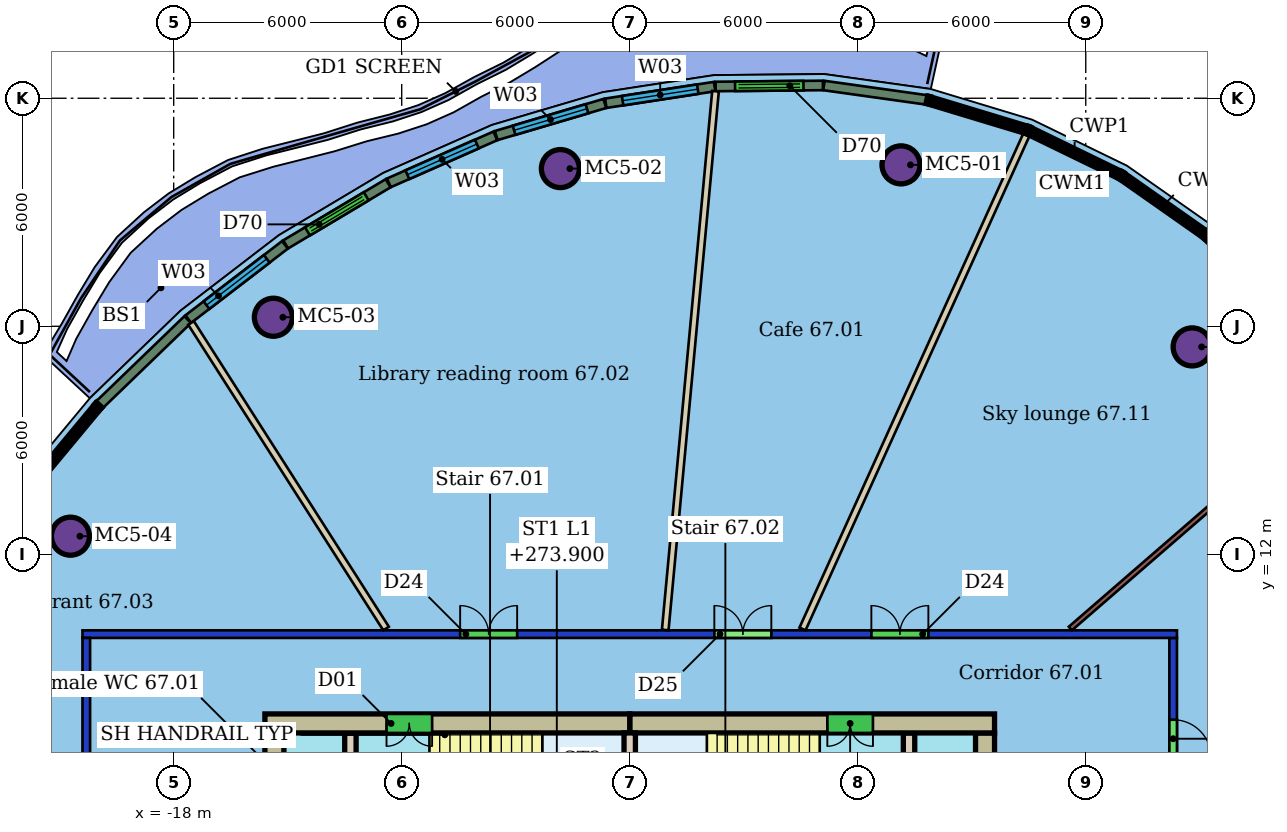
"""IFC4 building model, lengths in metres.
Left out: names, types, materials, properties, quantities, classifications, styles, units other than length and angle.
Written with IfcOpenShell. Run it as: python <this file> out.ifc"""

import sys

from ifc_helpers import new_model, si_unit, direction, frame, frame_2d, origin, origin_2d, place, context, subcontext, project, spatial, rectangle, hollow_circle, extrude, element, fill, save


model = new_model("IFC4")
c1 = context("Model", 3, precision=1e-05, world=origin(), true_north=direction((0.0, 1.0)))
c2 = subcontext(c1, "Body", "Model", "MODEL_VIEW")
j1 = project(units=[si_unit("LENGTHUNIT", "METRE"), si_unit("PLANEANGLEUNIT", "RADIAN")], contexts=[c1])
p1 = place(None, origin())
s1 = spatial("IfcSite", under=j1, at=p1, CompositionType="ELEMENT")
p2 = place(p1, origin())
s2 = spatial("IfcBuilding", under=s1, at=p2, CompositionType="ELEMENT")
p3 = place(p2, frame((0.0, 0.0, 272.1)))
s3 = spatial("IfcBuildingStorey", under=s2, at=p3, CompositionType="ELEMENT", Elevation=272.1)
for number, where, z_axis, x_axis in (
    (1, (1.138, 22.247, 0.0), (0.0, 0.0, 1.0), (1.0, 0.0, 0.0)),
    (2, (-7.825, 22.149, 0.0), (0.0, 0.0, 1.0), (1.0, 0.0, 0.0)),
    (3, (-15.377, 18.238, 0.0), (0.0, 0.0, 1.0), (1.0, 0.0, 0.0)),
    (4, (-20.718, 12.477, 0.0), (0.0, 0.0, 1.0), (1.0, 0.0, 0.0)),
    (5, (8.8, 17.457, 0.0), (0.0, 0.0, 1.0), (1.0, 0.0, 0.0)),
):
    element("IfcColumn", number, at=place(p3, frame(where, z_axis=z_axis, x_axis=x_axis)), inside=s3, PredefinedType="COLUMN", context=c2, shape_type="SweptSolid", body=[
        extrude(hollow_circle(Radius=0.5, WallThickness=0.04, at=origin_2d()), origin(), (0.0, 0.0, 1.0), 3.45),
    ])
p4 = place(p3, frame((-20.3, -9.8, 0.0), z_axis=(0.0, 0.0, 1.0), x_axis=(0.0, 1.0, 0.0)))
e6 = element("IfcWall", 6, at=p4, inside=s3, PredefinedType="PARTITIONING", context=c2, shape_type="SweptSolid", body=[
    extrude(rectangle(XDim=19.6, YDim=0.2, at=frame_2d((9.8, 0.0))), origin(), (0.0, 0.0, 1.0), 3.1),
])
p5 = place(p4, frame((13.142, 0.0, 0.0)))
e7 = element("IfcOpeningElement", 7, at=p5, cuts=e6, PredefinedType="OPENING", context=c2, shape_type="SweptSolid", body=[
    extrude(rectangle(XDim=1.5, YDim=2.4, at=frame_2d((0.75, 1.2))), frame((0.0, 0.11, 0.0), z_axis=(0.0, -1.0, 0.0), x_axis=(1.0, 0.0, 0.0)), (0.0, 0.0, 1.0), 0.22),
])
p6 = place(p4, frame((5.982, 0.0, 0.0)))
e8 = element("IfcOpeningElement", 8, at=p6, cuts=e6, PredefinedType="OPENING", context=c2, shape_type="SweptSolid", body=[
    extrude(rectangle(XDim=1.8, YDim=2.1, at=frame_2d((0.9, 1.05))), frame((0.0, 0.11, 0.0), z_axis=(0.0, -1.0, 0.0), x_axis=(1.0, 0.0, 0.0)), (0.0, 0.0, 1.0), 0.22),
])
p7 = place(p3, frame((-20.4, 9.9, 0.0), z_axis=(0.0, 0.0, 1.0), x_axis=(1.0, 0.0, 0.0)))
e9 = element("IfcWall", 9, at=p7, inside=s3, PredefinedType="PARTITIONING", context=c2, shape_type="SweptSolid", body=[
    extrude(rectangle(XDim=28.8, YDim=0.2, at=frame_2d((14.4, 0.0))), origin(), (0.0, 0.0, 1.0), 3.1),
])
p8 = place(p7, frame((16.626, 0.0, 0.0)))
e10 = element("IfcOpeningElement", 10, at=p8, cuts=e9, PredefinedType="OPENING", context=c2, shape_type="SweptSolid", body=[
    extrude(rectangle(XDim=1.5, YDim=2.4, at=frame_2d((0.75, 1.2))), frame((0.0, 0.11, 0.0), z_axis=(0.0, -1.0, 0.0), x_axis=(1.0, 0.0, 0.0)), (0.0, 0.0, 1.0), 0.22),
])
p9 = place(p7, frame((9.938, 0.0, 0.0)))
e11 = element("IfcOpeningElement", 11, at=p9, cuts=e9, PredefinedType="OPENING", context=c2, shape_type="SweptSolid", body=[
    extrude(rectangle(XDim=1.5, YDim=2.1, at=frame_2d((0.75, 1.05))), frame((0.0, 0.11, 0.0), z_axis=(0.0, -1.0, 0.0), x_axis=(1.0, 0.0, 0.0)), (0.0, 0.0, 1.0), 0.22),
])
p10 = place(p7, frame((20.758, 0.0, 0.0)))
e12 = element("IfcOpeningElement", 12, at=p10, cuts=e9, PredefinedType="OPENING", context=c2, shape_type="SweptSolid", body=[
    extrude(rectangle(XDim=1.5, YDim=2.1, at=frame_2d((0.75, 1.05))), frame((0.0, 0.11, 0.0), z_axis=(0.0, -1.0, 0.0), x_axis=(1.0, 0.0, 0.0)), (0.0, 0.0, 1.0), 0.22),
])
p11 = place(p3, frame((8.3, 9.8, 0.0), z_axis=(0.0, 0.0, 1.0), x_axis=(0.0, -1.0, 0.0)))
e13 = element("IfcWall", 13, at=p11, inside=s3, PredefinedType="PARTITIONING", context=c2, shape_type="SweptSolid", body=[
    extrude(rectangle(XDim=19.6, YDim=0.2, at=frame_2d((9.8, 0.0))), origin(), (0.0, 0.0, 1.0), 3.1),
])
p12 = place(p11, frame((7.396, 0.0, 0.0)))
e14 = element("IfcOpeningElement", 14, at=p12, cuts=e13, PredefinedType="OPENING", context=c2, shape_type="SweptSolid", body=[
    extrude(rectangle(XDim=1.8, YDim=2.4, at=frame_2d((0.9, 1.2))), frame((0.0, 0.11, 0.0), z_axis=(0.0, -1.0, 0.0), x_axis=(1.0, 0.0, 0.0)), (0.0, 0.0, 1.0), 0.22),
])
p13 = place(p11, frame((2.153, 0.0, 0.0)))
e15 = element("IfcOpeningElement", 15, at=p13, cuts=e13, PredefinedType="OPENING", context=c2, shape_type="SweptSolid", body=[
    extrude(rectangle(XDim=1.0, YDim=2.4, at=frame_2d((0.5, 1.2))), frame((0.0, 0.11, 0.0), z_axis=(0.0, -1.0, 0.0), x_axis=(1.0, 0.0, 0.0)), (0.0, 0.0, 1.0), 0.22),
])
p14 = place(p3, frame((4.438, 23.04, 0.0), z_axis=(0.0, 0.0, 1.0), x_axis=(-0.412668744216, -0.910881170926, 0.0)))
e16 = element("IfcWall", 16, at=p14, inside=s3, PredefinedType="PARTITIONING", context=c2, shape_type="SweptSolid", body=[
    extrude(rectangle(XDim=14.276, YDim=0.175, at=frame_2d((7.138, 0.0))), origin(), (0.0, 0.0, 1.0), 3.45),
])
p15 = place(p3, frame((-3.743, 24.185, 0.0), z_axis=(0.0, 0.0, 1.0), x_axis=(-0.092933304547, -0.995672336116, 0.0)))
e17 = element("IfcWall", 17, at=p15, inside=s3, PredefinedType="PARTITIONING", context=c2, shape_type="SweptSolid", body=[
    extrude(rectangle(XDim=14.239, YDim=0.175, at=frame_2d((7.119, 0.0))), origin(), (0.0, 0.0, 1.0), 3.45),
])
p16 = place(p3, frame((-17.543, 18.088, 0.0), z_axis=(0.0, 0.0, 1.0), x_axis=(0.537968123853, -0.842965181795, 0.0)))
e18 = element("IfcWall", 18, at=p16, inside=s3, PredefinedType="PARTITIONING", context=c2, shape_type="SweptSolid", body=[
    extrude(rectangle(XDim=9.538, YDim=0.175, at=frame_2d((4.769, 0.0))), origin(), (0.0, 0.0, 1.0), 3.45),
])
p17 = place(p3, frame((15.709, 8.071, 0.0), z_axis=(0.0, 0.0, 1.0), x_axis=(-0.937315535256, -0.348481832193, 0.0)))
e19 = element("IfcWall", 19, at=p17, inside=s3, PredefinedType="PARTITIONING", context=c2, shape_type="SweptSolid", body=[
    extrude(rectangle(XDim=7.742, YDim=0.3, at=frame_2d((3.871, 0.0))), origin(), (0.0, 0.0, 1.0), 3.45),
])
p18 = place(p3, frame((12.698, 16.203, 0.0), z_axis=(0.0, 0.0, 1.0), x_axis=(-0.75573450221, -0.654878127723, 0.0)))
e20 = element("IfcWall", 20, at=p18, inside=s3, PredefinedType="PARTITIONING", context=c2, shape_type="SweptSolid", body=[
    extrude(rectangle(XDim=9.399, YDim=0.125, at=frame_2d((4.7, 0.0))), origin(), (0.0, 0.0, 1.0), 3.45),
])
p19 = place(p3, frame((1.803, 23.958, 0.0), z_axis=(0.0, 0.0, 1.0), x_axis=(-0.99032300217, 0.138781667998, 0.0)))
e21 = element("IfcWall", 21, at=p19, inside=s3, PredefinedType="SOLIDWALL", context=c2, shape_type="SweptSolid", body=[
    extrude(rectangle(XDim=2.72, YDim=0.25, at=frame_2d((1.36, 0.0))), origin(), (0.0, 0.0, 1.0), 3.15),
])
p20 = place(p3, frame((-0.916, 24.337, 0.0), z_axis=(0.0, 0.0, 1.0), x_axis=(-0.999952276814, -0.009769549307, 0.0)))
e22 = element("IfcWall", 22, at=p20, inside=s3, PredefinedType="SOLIDWALL", context=c2, shape_type="SweptSolid", body=[
    extrude(rectangle(XDim=2.824, YDim=0.25, at=frame_2d((1.412, 0.0))), origin(), (0.0, 0.0, 1.0), 3.15),
])
p21 = place(p20, frame((0.512, 0.0, 0.0)))
e23 = element("IfcOpeningElement", 23, at=p21, cuts=e22, PredefinedType="OPENING", context=c2, shape_type="SweptSolid", body=[
    extrude(rectangle(XDim=1.8, YDim=2.4, at=frame_2d((0.9, 1.2))), frame((0.0, 0.135, 0.0), z_axis=(0.0, -1.0, 0.0), x_axis=(1.0, 0.0, 0.0)), (0.0, 0.0, 1.0), 0.27),
])
p22 = place(p3, frame((-3.766, 24.308, 0.0), z_axis=(0.0, 0.0, 1.0), x_axis=(-0.988456248217, -0.151506585204, 0.0)))
e24 = element("IfcWall", 24, at=p22, inside=s3, PredefinedType="SOLIDWALL", context=c2, shape_type="SweptSolid", body=[
    extrude(rectangle(XDim=2.899, YDim=0.25, at=frame_2d((1.449, 0.0))), origin(), (0.0, 0.0, 1.0), 3.15),
])
p23 = place(p22, frame((0.449, 0.0, 0.9)))
e25 = element("IfcOpeningElement", 25, at=p23, cuts=e24, PredefinedType="OPENING", context=c2, shape_type="SweptSolid", body=[
    extrude(rectangle(XDim=2.0, YDim=2.1, at=frame_2d((1.0, 1.05))), frame((0.0, 0.135, 0.0), z_axis=(0.0, -1.0, 0.0), x_axis=(1.0, 0.0, 0.0)), (0.0, 0.0, 1.0), 0.27),
])
p24 = place(p3, frame((-6.655, 23.863, 0.0), z_axis=(0.0, 0.0, 1.0), x_axis=(-0.958992915497, -0.283430040798, 0.0)))
e26 = element("IfcWall", 26, at=p24, inside=s3, PredefinedType="SOLIDWALL", context=c2, shape_type="SweptSolid", body=[
    extrude(rectangle(XDim=2.98, YDim=0.25, at=frame_2d((1.49, 0.0))), origin(), (0.0, 0.0, 1.0), 3.15),
])
p25 = place(p24, frame((0.49, 0.0, 0.9)))
e27 = element("IfcOpeningElement", 27, at=p25, cuts=e26, PredefinedType="OPENING", context=c2, shape_type="SweptSolid", body=[
    extrude(rectangle(XDim=2.0, YDim=2.1, at=frame_2d((1.0, 1.05))), frame((0.0, 0.135, 0.0), z_axis=(0.0, -1.0, 0.0), x_axis=(1.0, 0.0, 0.0)), (0.0, 0.0, 1.0), 0.27),
])
p26 = place(p3, frame((-9.536, 23.01, 0.0), z_axis=(0.0, 0.0, 1.0), x_axis=(-0.914844180747, -0.403807039258, 0.0)))
e28 = element("IfcWall", 28, at=p26, inside=s3, PredefinedType="SOLIDWALL", context=c2, shape_type="SweptSolid", body=[
    extrude(rectangle(XDim=3.062, YDim=0.25, at=frame_2d((1.531, 0.0))), origin(), (0.0, 0.0, 1.0), 3.15),
])
p27 = place(p26, frame((0.531, 0.0, 0.9)))
e29 = element("IfcOpeningElement", 29, at=p27, cuts=e28, PredefinedType="OPENING", context=c2, shape_type="SweptSolid", body=[
    extrude(rectangle(XDim=2.0, YDim=2.1, at=frame_2d((1.0, 1.05))), frame((0.0, 0.135, 0.0), z_axis=(0.0, -1.0, 0.0), x_axis=(1.0, 0.0, 0.0)), (0.0, 0.0, 1.0), 0.27),
])
p28 = place(p3, frame((-12.358, 21.763, 0.0), z_axis=(0.0, 0.0, 1.0), x_axis=(-0.858787089802, -0.512332640371, 0.0)))
e30 = element("IfcWall", 30, at=p28, inside=s3, PredefinedType="SOLIDWALL", context=c2, shape_type="SweptSolid", body=[
    extrude(rectangle(XDim=3.139, YDim=0.25, at=frame_2d((1.57, 0.0))), origin(), (0.0, 0.0, 1.0), 3.15),
])
p29 = place(p28, frame((0.67, 0.0, 0.0)))
e31 = element("IfcOpeningElement", 31, at=p29, cuts=e30, PredefinedType="OPENING", context=c2, shape_type="SweptSolid", body=[
    extrude(rectangle(XDim=1.8, YDim=2.4, at=frame_2d((0.9, 1.2))), frame((0.0, 0.135, 0.0), z_axis=(0.0, -1.0, 0.0), x_axis=(1.0, 0.0, 0.0)), (0.0, 0.0, 1.0), 0.27),
])
p30 = place(p3, frame((-15.073, 20.142, 0.0), z_axis=(0.0, 0.0, 1.0), x_axis=(-0.793206691654, -0.608952497586, 0.0)))
e32 = element("IfcWall", 32, at=p30, inside=s3, PredefinedType="SOLIDWALL", context=c2, shape_type="SweptSolid", body=[
    extrude(rectangle(XDim=3.207, YDim=0.25, at=frame_2d((1.603, 0.0))), origin(), (0.0, 0.0, 1.0), 3.15),
])
p31 = place(p30, frame((0.603, 0.0, 0.9)))
e33 = element("IfcOpeningElement", 33, at=p31, cuts=e32, PredefinedType="OPENING", context=c2, shape_type="SweptSolid", body=[
    extrude(rectangle(XDim=2.0, YDim=2.1, at=frame_2d((1.0, 1.05))), frame((0.0, 0.135, 0.0), z_axis=(0.0, -1.0, 0.0), x_axis=(1.0, 0.0, 0.0)), (0.0, 0.0, 1.0), 0.27),
])
p32 = place(p3, frame((-17.633, 18.175, 0.0), z_axis=(0.0, 0.0, 1.0), x_axis=(-0.719595006307, -0.694393999757, 0.0)))
e34 = element("IfcWall", 34, at=p32, inside=s3, PredefinedType="SOLIDWALL", context=c2, shape_type="SweptSolid", body=[
    extrude(rectangle(XDim=3.216, YDim=0.25, at=frame_2d((1.608, 0.0))), origin(), (0.0, 0.0, 1.0), 3.15),
])
p33 = place(p3, frame((3.6, 7.55, 0.0), z_axis=(0.0, 0.0, 1.0), x_axis=(-1.0, 0.0, 0.0)))
e35 = element("IfcWall", 35, at=p33, inside=s3, PredefinedType="SHEAR", context=c2, shape_type="SweptSolid", body=[
    extrude(rectangle(XDim=9.6, YDim=0.5, at=frame_2d((4.8, 0.0))), origin(), (0.0, 0.0, 1.0), 3.3),
])
p34 = place(p33, frame((3.2, 0.0, 0.0)))
e36 = element("IfcOpeningElement", 36, at=p34, cuts=e35, PredefinedType="OPENING", context=c2, shape_type="SweptSolid", body=[
    extrude(rectangle(XDim=1.2, YDim=2.1, at=frame_2d((0.6, 1.05))), frame((0.0, 0.26, 0.0), z_axis=(0.0, -1.0, 0.0), x_axis=(1.0, 0.0, 0.0)), (0.0, 0.0, 1.0), 0.52),
])
p35 = place(p3, frame((-6.0, 7.55, 0.0), z_axis=(0.0, 0.0, 1.0), x_axis=(-1.0, 0.0, 0.0)))
e37 = element("IfcWall", 37, at=p35, inside=s3, PredefinedType="SHEAR", context=c2, shape_type="SweptSolid", body=[
    extrude(rectangle(XDim=9.6, YDim=0.5, at=frame_2d((4.8, 0.0))), origin(), (0.0, 0.0, 1.0), 3.3),
])
p36 = place(p35, frame((5.2, 0.0, 0.0)))
e38 = element("IfcOpeningElement", 38, at=p36, cuts=e37, PredefinedType="OPENING", context=c2, shape_type="SweptSolid", body=[
    extrude(rectangle(XDim=1.2, YDim=2.1, at=frame_2d((0.6, 1.05))), frame((0.0, 0.26, 0.0), z_axis=(0.0, -1.0, 0.0), x_axis=(1.0, 0.0, 0.0)), (0.0, 0.0, 1.0), 0.52),
])
p37 = place(p3, frame((-15.35, 7.3, 0.0), z_axis=(0.0, 0.0, 1.0), x_axis=(0.0, -1.0, 0.0)))
e39 = element("IfcWall", 39, at=p37, inside=s3, PredefinedType="SHEAR", context=c2, shape_type="SweptSolid", body=[
    extrude(rectangle(XDim=14.6, YDim=0.5, at=frame_2d((7.3, 0.0))), origin(), (0.0, 0.0, 1.0), 3.3),
])
p38 = place(p37, frame((10.6, 0.0, 0.0)))
e40 = element("IfcOpeningElement", 40, at=p38, cuts=e39, PredefinedType="OPENING", context=c2, shape_type="SweptSolid", body=[
    extrude(rectangle(XDim=1.2, YDim=2.1, at=frame_2d((0.6, 1.05))), frame((0.0, 0.26, 0.0), z_axis=(0.0, -1.0, 0.0), x_axis=(1.0, 0.0, 0.0)), (0.0, 0.0, 1.0), 0.52),
])
p39 = place(p37, frame((2.8, 0.0, 0.0)))
e41 = element("IfcOpeningElement", 41, at=p39, cuts=e39, PredefinedType="OPENING", context=c2, shape_type="SweptSolid", body=[
    extrude(rectangle(XDim=1.2, YDim=2.1, at=frame_2d((0.6, 1.05))), frame((0.0, 0.26, 0.0), z_axis=(0.0, -1.0, 0.0), x_axis=(1.0, 0.0, 0.0)), (0.0, 0.0, 1.0), 0.52),
])
p40 = place(p3, frame((3.35, -7.3, 0.0), z_axis=(0.0, 0.0, 1.0), x_axis=(0.0, 1.0, 0.0)))
e42 = element("IfcWall", 42, at=p40, inside=s3, PredefinedType="SHEAR", context=c2, shape_type="SweptSolid", body=[
    extrude(rectangle(XDim=14.6, YDim=0.5, at=frame_2d((7.3, 0.0))), origin(), (0.0, 0.0, 1.0), 3.3),
])
p41 = place(p40, frame((2.8, 0.0, 0.0)))
e43 = element("IfcOpeningElement", 43, at=p41, cuts=e42, PredefinedType="OPENING", context=c2, shape_type="SweptSolid", body=[
    extrude(rectangle(XDim=1.2, YDim=2.1, at=frame_2d((0.6, 1.05))), frame((0.0, 0.26, 0.0), z_axis=(0.0, -1.0, 0.0), x_axis=(1.0, 0.0, 0.0)), (0.0, 0.0, 1.0), 0.52),
])
p42 = place(p40, frame((10.6, 0.0, 0.0)))
e44 = element("IfcOpeningElement", 44, at=p42, cuts=e42, PredefinedType="OPENING", context=c2, shape_type="SweptSolid", body=[
    extrude(rectangle(XDim=1.2, YDim=2.1, at=frame_2d((0.6, 1.05))), frame((0.0, 0.26, 0.0), z_axis=(0.0, -1.0, 0.0), x_axis=(1.0, 0.0, 0.0)), (0.0, 0.0, 1.0), 0.52),
])
p43 = place(p3, frame((-13.35, 7.3, 0.0), z_axis=(0.0, 0.0, 1.0), x_axis=(0.0, -1.0, 0.0)))
e45 = element("IfcWall", 45, at=p43, inside=s3, PredefinedType="SHEAR", context=c2, shape_type="SweptSolid", body=[
    extrude(rectangle(XDim=14.6, YDim=0.3, at=frame_2d((7.3, 0.0))), origin(), (0.0, 0.0, 1.0), 3.3),
])
p44 = place(p43, frame((6.55, 0.0, 0.0)))
e46 = element("IfcOpeningElement", 46, at=p44, cuts=e45, PredefinedType="OPENING", context=c2, shape_type="SweptSolid", body=[
    extrude(rectangle(XDim=1.5, YDim=2.1, at=frame_2d((0.75, 1.05))), frame((0.0, 0.16, 0.0), z_axis=(0.0, -1.0, 0.0), x_axis=(1.0, 0.0, 0.0)), (0.0, 0.0, 1.0), 0.32),
])
p45 = place(p3, frame((1.35, -7.3, 0.0), z_axis=(0.0, 0.0, 1.0), x_axis=(0.0, 1.0, 0.0)))
e47 = element("IfcWall", 47, at=p45, inside=s3, PredefinedType="SHEAR", context=c2, shape_type="SweptSolid", body=[
    extrude(rectangle(XDim=14.6, YDim=0.3, at=frame_2d((7.3, 0.0))), origin(), (0.0, 0.0, 1.0), 3.3),
])
p46 = place(p45, frame((1.21, 0.0, 0.0)))
e48 = element("IfcOpeningElement", 48, at=p46, cuts=e47, PredefinedType="OPENING", context=c2, shape_type="SweptSolid", body=[
    extrude(rectangle(XDim=1.0, YDim=2.1, at=frame_2d((0.5, 1.05))), frame((0.0, 0.16, 0.0), z_axis=(0.0, -1.0, 0.0), x_axis=(1.0, 0.0, 0.0)), (0.0, 0.0, 1.0), 0.32),
])
p47 = place(p45, frame((6.55, 0.0, 0.0)))
e49 = element("IfcOpeningElement", 49, at=p47, cuts=e47, PredefinedType="OPENING", context=c2, shape_type="SweptSolid", body=[
    extrude(rectangle(XDim=1.5, YDim=2.1, at=frame_2d((0.75, 1.05))), frame((0.0, 0.16, 0.0), z_axis=(0.0, -1.0, 0.0), x_axis=(1.0, 0.0, 0.0)), (0.0, 0.0, 1.0), 0.32),
])
p48 = place(p3, frame((-6.0, 3.88, 0.0), z_axis=(0.0, 0.0, 1.0), x_axis=(0.0, 1.0, 0.0)))
e50 = element("IfcWall", 50, at=p48, inside=s3, PredefinedType="SHEAR", context=c2, shape_type="SweptSolid", body=[
    extrude(rectangle(XDim=3.42, YDim=0.3, at=frame_2d((1.71, 0.0))), origin(), (0.0, 0.0, 1.0), 3.3),
])
p49 = place(p8, origin())
e51 = element("IfcDoor", 51, at=p49, inside=s3, OperationType="DOUBLE_DOOR_SINGLE_SWING", PredefinedType="DOOR", context=c2, shape_type="SweptSolid", body=[
    extrude(rectangle(XDim=1.5, YDim=2.4, at=frame_2d((0.75, 1.2))), frame((0.0, 0.025, 0.0), z_axis=(0.0, -1.0, 0.0), x_axis=(1.0, 0.0, 0.0)), (0.0, 0.0, 1.0), 0.05),
])
fill(e10, e51)
p50 = place(p9, origin())
e52 = element("IfcDoor", 52, at=p50, inside=s3, OperationType="DOUBLE_DOOR_SINGLE_SWING", PredefinedType="DOOR", context=c2, shape_type="SweptSolid", body=[
    extrude(rectangle(XDim=1.5, YDim=2.1, at=frame_2d((0.75, 1.05))), frame((0.0, 0.025, 0.0), z_axis=(0.0, -1.0, 0.0), x_axis=(1.0, 0.0, 0.0)), (0.0, 0.0, 1.0), 0.05),
])
fill(e11, e52)
p51 = place(p13, origin())
e53 = element("IfcDoor", 53, at=p51, inside=s3, OperationType="SINGLE_SWING_RIGHT", PredefinedType="DOOR", context=c2, shape_type="SweptSolid", body=[
    extrude(rectangle(XDim=1.0, YDim=2.4, at=frame_2d((0.5, 1.2))), frame((0.0, 0.025, 0.0), z_axis=(0.0, -1.0, 0.0), x_axis=(1.0, 0.0, 0.0)), (0.0, 0.0, 1.0), 0.05),
])
fill(e15, e53)
p52 = place(p10, origin())
e54 = element("IfcDoor", 54, at=p52, inside=s3, OperationType="DOUBLE_DOOR_SINGLE_SWING", PredefinedType="DOOR", context=c2, shape_type="SweptSolid", body=[
    extrude(rectangle(XDim=1.5, YDim=2.1, at=frame_2d((0.75, 1.05))), frame((0.0, 0.025, 0.0), z_axis=(0.0, -1.0, 0.0), x_axis=(1.0, 0.0, 0.0)), (0.0, 0.0, 1.0), 0.05),
])
fill(e12, e54)
p53 = place(p21, origin())
e55 = element("IfcDoor", 55, at=p53, inside=s3, OperationType="DOUBLE_DOOR_SLIDING", PredefinedType="DOOR", context=c2, shape_type="SweptSolid", body=[
    extrude(rectangle(XDim=1.8, YDim=2.4, at=frame_2d((0.9, 1.2))), frame((0.0, 0.025, 0.0), z_axis=(0.0, -1.0, 0.0), x_axis=(1.0, 0.0, 0.0)), (0.0, 0.0, 1.0), 0.05),
])
fill(e23, e55)
p54 = place(p23, origin())
e56 = element("IfcWindow", 56, at=p54, inside=s3, PartitioningType="SINGLE_PANEL", PredefinedType="WINDOW", context=c2, shape_type="SweptSolid", body=[
    extrude(rectangle(XDim=2.0, YDim=2.1, at=frame_2d((1.0, 1.05))), frame((0.0, 0.03, 0.0), z_axis=(0.0, -1.0, 0.0), x_axis=(1.0, 0.0, 0.0)), (0.0, 0.0, 1.0), 0.06),
])
fill(e25, e56)
p55 = place(p25, origin())
e57 = element("IfcWindow", 57, at=p55, inside=s3, PartitioningType="SINGLE_PANEL", PredefinedType="WINDOW", context=c2, shape_type="SweptSolid", body=[
    extrude(rectangle(XDim=2.0, YDim=2.1, at=frame_2d((1.0, 1.05))), frame((0.0, 0.03, 0.0), z_axis=(0.0, -1.0, 0.0), x_axis=(1.0, 0.0, 0.0)), (0.0, 0.0, 1.0), 0.06),
])
fill(e27, e57)
p56 = place(p27, origin())
e58 = element("IfcWindow", 58, at=p56, inside=s3, PartitioningType="SINGLE_PANEL", PredefinedType="WINDOW", context=c2, shape_type="SweptSolid", body=[
    extrude(rectangle(XDim=2.0, YDim=2.1, at=frame_2d((1.0, 1.05))), frame((0.0, 0.03, 0.0), z_axis=(0.0, -1.0, 0.0), x_axis=(1.0, 0.0, 0.0)), (0.0, 0.0, 1.0), 0.06),
])
fill(e29, e58)
p57 = place(p29, origin())
e59 = element("IfcDoor", 59, at=p57, inside=s3, OperationType="DOUBLE_DOOR_SLIDING", PredefinedType="DOOR", context=c2, shape_type="SweptSolid", body=[
    extrude(rectangle(XDim=1.8, YDim=2.4, at=frame_2d((0.9, 1.2))), frame((0.0, 0.025, 0.0), z_axis=(0.0, -1.0, 0.0), x_axis=(1.0, 0.0, 0.0)), (0.0, 0.0, 1.0), 0.05),
])
fill(e31, e59)
p58 = place(p31, origin())
e60 = element("IfcWindow", 60, at=p58, inside=s3, PartitioningType="SINGLE_PANEL", PredefinedType="WINDOW", context=c2, shape_type="SweptSolid", body=[
    extrude(rectangle(XDim=2.0, YDim=2.1, at=frame_2d((1.0, 1.05))), frame((0.0, 0.03, 0.0), z_axis=(0.0, -1.0, 0.0), x_axis=(1.0, 0.0, 0.0)), (0.0, 0.0, 1.0), 0.06),
])
fill(e33, e60)
p59 = place(p34, origin())
e61 = element("IfcDoor", 61, at=p59, inside=s3, OperationType="DOUBLE_DOOR_SINGLE_SWING", PredefinedType="NOTDEFINED", context=c2, shape_type="SweptSolid", body=[
    extrude(rectangle(XDim=1.2, YDim=2.1, at=frame_2d((0.6, 1.05))), frame((0.0, 0.025, 0.0), z_axis=(0.0, -1.0, 0.0), x_axis=(1.0, 0.0, 0.0)), (0.0, 0.0, 1.0), 0.05),
])
fill(e36, e61)
p60 = place(p36, origin())
e62 = element("IfcDoor", 62, at=p60, inside=s3, OperationType="DOUBLE_DOOR_SINGLE_SWING", PredefinedType="NOTDEFINED", context=c2, shape_type="SweptSolid", body=[
    extrude(rectangle(XDim=1.2, YDim=2.1, at=frame_2d((0.6, 1.05))), frame((0.0, 0.025, 0.0), z_axis=(0.0, -1.0, 0.0), x_axis=(1.0, 0.0, 0.0)), (0.0, 0.0, 1.0), 0.05),
])
fill(e38, e62)
save(model, sys.argv[1])
